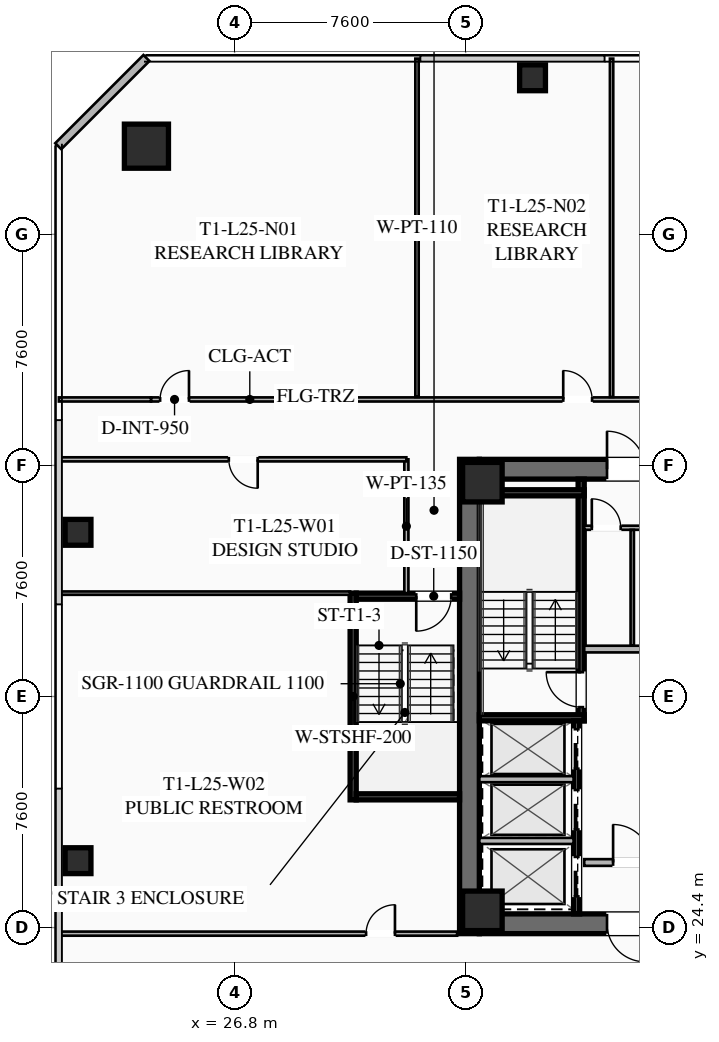
"""IFC4 building model, lengths in metres.
Left out: names, types, materials, properties, quantities, classifications, styles, units other than length and angle.
Written with IfcOpenShell. Run it as: python <this file> out.ifc"""

import sys

from ifc_helpers import new_model, si_unit, direction, frame, frame_2d, origin, origin_2d, place, context, subcontext, project, spatial, rectangle, hollow_rectangle, extrude, element, fill, save


model = new_model("IFC4")
c1 = context("Model", 3, precision=1e-05, world=origin(), true_north=direction((0.0, 1.0)))
c2 = subcontext(c1, "Body", "Model", "MODEL_VIEW")
j1 = project(units=[si_unit("LENGTHUNIT", "METRE"), si_unit("PLANEANGLEUNIT", "RADIAN")], contexts=[c1])
p1 = place(None, origin())
s1 = spatial("IfcSite", under=j1, at=p1, CompositionType="ELEMENT")
p2 = place(p1, origin())
s2 = spatial("IfcBuilding", under=s1, at=p2, CompositionType="ELEMENT")
p3 = place(p2, frame((0.0, 0.0, 95.6)))
s3 = spatial("IfcBuildingStorey", under=s2, at=p3, CompositionType="ELEMENT", Elevation=95.6)
p4 = place(p3, frame((34.525, 24.2, 0.0), z_axis=(0.0, 0.0, 1.0), x_axis=(0.0, 1.0, 0.0)))
e1 = element("IfcWall", 1, at=p4, inside=s3, PredefinedType="SHEAR", context=c2, shape_type="SweptSolid", body=[
    extrude(rectangle(XDim=15.6, YDim=0.65, at=frame_2d((7.8, 0.0))), origin(), (0.0, 0.0, 1.0), 3.55),
])
p5 = place(p3, frame((49.15, 24.525, 0.0), z_axis=(0.0, 0.0, 1.0), x_axis=(-1.0, 0.0, 0.0)))
e2 = element("IfcWall", 2, at=p5, inside=s3, PredefinedType="SHEAR", context=c2, shape_type="SweptSolid", body=[
    extrude(rectangle(XDim=14.3, YDim=0.65, at=frame_2d((7.15, 0.0))), origin(), (0.0, 0.0, 1.0), 3.55),
])
p6 = place(p5, frame((8.85, 0.0, 0.0)))
e3 = element("IfcOpeningElement", 3, at=p6, cuts=e2, PredefinedType="OPENING", context=c2, shape_type="SweptSolid", body=[
    extrude(rectangle(XDim=1.25, YDim=2.25, at=frame_2d((0.625, 1.125))), frame((0.0, 0.335, 0.0), z_axis=(0.0, -1.0, 0.0), x_axis=(1.0, 0.0, 0.0)), (0.0, 0.0, 1.0), 0.67),
])
p7 = place(p5, frame((3.8, 0.0, 0.0)))
e4 = element("IfcOpeningElement", 4, at=p7, cuts=e2, PredefinedType="OPENING", context=c2, shape_type="SweptSolid", body=[
    extrude(rectangle(XDim=1.25, YDim=2.25, at=frame_2d((0.625, 1.125))), frame((0.0, 0.335, 0.0), z_axis=(0.0, -1.0, 0.0), x_axis=(1.0, 0.0, 0.0)), (0.0, 0.0, 1.0), 0.67),
])
p8 = place(p3, frame((34.85, 39.475, 0.0), z_axis=(0.0, 0.0, 1.0), x_axis=(1.0, 0.0, 0.0)))
e5 = element("IfcWall", 5, at=p8, inside=s3, PredefinedType="SHEAR", context=c2, shape_type="SweptSolid", body=[
    extrude(rectangle(XDim=14.3, YDim=0.65, at=frame_2d((7.15, 0.0))), origin(), (0.0, 0.0, 1.0), 3.55),
])
p9 = place(p8, frame((4.2, 0.0, 0.0)))
e6 = element("IfcOpeningElement", 6, at=p9, cuts=e5, PredefinedType="OPENING", context=c2, shape_type="SweptSolid", body=[
    extrude(rectangle(XDim=1.25, YDim=2.25, at=frame_2d((0.625, 1.125))), frame((0.0, 0.335, 0.0), z_axis=(0.0, -1.0, 0.0), x_axis=(1.0, 0.0, 0.0)), (0.0, 0.0, 1.0), 0.67),
])
p10 = place(p8, frame((9.25, 0.0, 0.0)))
e7 = element("IfcOpeningElement", 7, at=p10, cuts=e5, PredefinedType="OPENING", context=c2, shape_type="SweptSolid", body=[
    extrude(rectangle(XDim=1.25, YDim=2.25, at=frame_2d((0.625, 1.125))), frame((0.0, 0.335, 0.0), z_axis=(0.0, -1.0, 0.0), x_axis=(1.0, 0.0, 0.0)), (0.0, 0.0, 1.0), 0.67),
])
for number, where, z_axis, x_axis in (
    (8, (34.95, 24.95, 0.0), (0.0, 0.0, 1.0), (1.0, 0.0, 0.0)),
    (9, (34.95, 39.05, 0.0), (0.0, 0.0, 1.0), (1.0, 0.0, 0.0)),
):
    element("IfcColumn", number, at=place(p3, frame(where, z_axis=z_axis, x_axis=x_axis)), inside=s3, PredefinedType="COLUMN", context=c2, shape_type="SweptSolid", body=[
        extrude(hollow_rectangle(XDim=1.3, YDim=1.3, WallThickness=0.05, at=origin_2d()), origin(), (0.0, 0.0, 1.0), 3.35),
    ])
p11 = place(p3, frame((23.9, 50.1, 0.0), z_axis=(0.0, 0.0, 1.0), x_axis=(1.0, 0.0, 0.0)))
e10 = element("IfcColumn", 10, at=p11, inside=s3, PredefinedType="COLUMN", context=c2, shape_type="SweptSolid", body=[
    extrude(hollow_rectangle(XDim=1.45, YDim=1.45, WallThickness=0.055, at=origin_2d()), origin(), (0.0, 0.0, 1.0), 3.35),
])
for number, where, z_axis, x_axis in (
    (11, (36.6, 52.35, 0.0), (0.0, 0.0, 1.0), (1.0, 0.0, 0.0)),
    (12, (21.65, 37.4, 0.0), (0.0, 0.0, 1.0), (1.0, 0.0, 0.0)),
    (13, (21.65, 26.6, 0.0), (0.0, 0.0, 1.0), (1.0, 0.0, 0.0)),
):
    element("IfcColumn", number, at=place(p3, frame(where, z_axis=z_axis, x_axis=x_axis)), inside=s3, PredefinedType="COLUMN", context=c2, shape_type="SweptSolid", body=[
        extrude(hollow_rectangle(XDim=0.85, YDim=0.85, WallThickness=0.035, at=origin_2d()), origin(), (0.0, 0.0, 1.0), 3.35),
    ])
p12 = place(p3, frame((21.0, 50.1, 0.0), z_axis=(0.0, 0.0, 1.0), x_axis=(0.707106781187, 0.707106781187, 0.0)))
e14 = element("IfcWall", 14, at=p12, inside=s3, PredefinedType="SOLIDWALL", context=c2, shape_type="SweptSolid", body=[
    extrude(rectangle(XDim=4.101, YDim=0.28, at=frame_2d((2.051, 0.0))), origin(), (0.0, 0.0, 1.0), 3.35),
])
p13 = place(p3, frame((38.2, 31.2, 0.0), z_axis=(0.0, 0.0, 1.0), x_axis=(0.0, 1.0, 0.0)))
e15 = element("IfcWall", 15, at=p13, inside=s3, PredefinedType="SHEAR", context=c2, shape_type="SweptSolid", body=[
    extrude(rectangle(XDim=7.95, YDim=0.2, at=frame_2d((3.975, 0.0))), origin(), (0.0, 0.0, 1.0), 3.35),
])
p14 = place(p13, frame((0.45, 0.0, 0.0)))
e16 = element("IfcOpeningElement", 16, at=p14, cuts=e15, PredefinedType="OPENING", context=c2, shape_type="SweptSolid", body=[
    extrude(rectangle(XDim=1.15, YDim=2.2, at=frame_2d((0.575, 1.1))), frame((0.0, 0.11, 0.0), z_axis=(0.0, -1.0, 0.0), x_axis=(1.0, 0.0, 0.0)), (0.0, 0.0, 1.0), 0.22),
])
for number, where, z_axis, x_axis in (
    (17, (34.85, 31.3, 0.0), (0.0, 0.0, 1.0), (1.0, 0.0, 0.0)),
    (18, (34.85, 38.7, 0.0), (0.0, 0.0, 1.0), (1.0, 0.0, 0.0)),
):
    element("IfcWall", number, at=place(p3, frame(where, z_axis=z_axis, x_axis=x_axis)), inside=s3, PredefinedType="SHEAR", context=c2, shape_type="SweptSolid", body=[
        extrude(rectangle(XDim=3.45, YDim=0.2, at=frame_2d((1.725, 0.0))), origin(), (0.0, 0.0, 1.0), 3.35),
    ])
p15 = place(p3, frame((38.3, 33.56, 0.0), z_axis=(0.0, 0.0, 1.0), x_axis=(1.0, 0.0, 0.0)))
e19 = element("IfcWall", 19, at=p15, inside=s3, PredefinedType="SOLIDWALL", context=c2, shape_type="SweptSolid", body=[
    extrude(rectangle(XDim=3.15, YDim=0.22, at=frame_2d((1.575, 0.0))), origin(), (0.0, 0.0, 1.0), 2.703),
])
p16 = place(p3, frame((38.3, 26.54, 0.0), z_axis=(0.0, 0.0, 1.0), x_axis=(1.0, 0.0, 0.0)))
e20 = element("IfcWall", 20, at=p16, inside=s3, PredefinedType="SOLIDWALL", context=c2, shape_type="SweptSolid", body=[
    extrude(rectangle(XDim=3.15, YDim=0.22, at=frame_2d((1.575, 0.0))), origin(), (0.0, 0.0, 1.0), 2.703),
])
p17 = place(p16, frame((0.95, 0.0, 0.0)))
e21 = element("IfcOpeningElement", 21, at=p17, cuts=e20, PredefinedType="OPENING", context=c2, shape_type="SweptSolid", body=[
    extrude(rectangle(XDim=1.25, YDim=2.25, at=frame_2d((0.625, 1.125))), frame((0.0, 0.12, 0.0), z_axis=(0.0, -1.0, 0.0), x_axis=(1.0, 0.0, 0.0)), (0.0, 0.0, 1.0), 0.24),
])
p18 = place(p3, frame((38.05, 24.85, 0.0), z_axis=(0.0, 0.0, 1.0), x_axis=(0.0, 1.0, 0.0)))
e22 = element("IfcWall", 22, at=p18, inside=s3, PredefinedType="SHEAR", context=c2, shape_type="SweptSolid", body=[
    extrude(rectangle(XDim=6.35, YDim=0.2, at=frame_2d((3.175, 0.0))), origin(), (0.0, 0.0, 1.0), 3.35),
])
p19 = place(p18, frame((4.775, 0.0, 0.0)))
e23 = element("IfcOpeningElement", 23, at=p19, cuts=e22, PredefinedType="OPENING", context=c2, shape_type="SweptSolid", body=[
    extrude(rectangle(XDim=1.3, YDim=2.25, at=frame_2d((0.65, 1.125))), frame((0.0, 0.11, 0.0), z_axis=(0.0, -1.0, 0.0), x_axis=(1.0, 0.0, 0.0)), (0.0, 0.0, 1.0), 0.22),
])
p20 = place(p18, frame((2.775, 0.0, 0.0)))
e24 = element("IfcOpeningElement", 24, at=p20, cuts=e22, PredefinedType="OPENING", context=c2, shape_type="SweptSolid", body=[
    extrude(rectangle(XDim=1.3, YDim=2.25, at=frame_2d((0.65, 1.125))), frame((0.0, 0.11, 0.0), z_axis=(0.0, -1.0, 0.0), x_axis=(1.0, 0.0, 0.0)), (0.0, 0.0, 1.0), 0.22),
])
p21 = place(p18, frame((0.575, 0.0, 0.0)))
e25 = element("IfcOpeningElement", 25, at=p21, cuts=e22, PredefinedType="OPENING", context=c2, shape_type="SweptSolid", body=[
    extrude(rectangle(XDim=1.3, YDim=2.25, at=frame_2d((0.65, 1.125))), frame((0.0, 0.11, 0.0), z_axis=(0.0, -1.0, 0.0), x_axis=(1.0, 0.0, 0.0)), (0.0, 0.0, 1.0), 0.22),
])
for number, where, z_axis, x_axis in (
    (26, (34.85, 27.25, 0.0), (0.0, 0.0, 1.0), (1.0, 0.0, 0.0)),
    (27, (34.85, 29.28, 0.0), (0.0, 0.0, 1.0), (1.0, 0.0, 0.0)),
):
    element("IfcWall", number, at=place(p3, frame(where, z_axis=z_axis, x_axis=x_axis)), inside=s3, PredefinedType="SOLIDWALL", context=c2, shape_type="SweptSolid", body=[
        extrude(rectangle(XDim=3.1, YDim=0.2, at=frame_2d((1.55, 0.0))), origin(), (0.0, 0.0, 1.0), 3.35),
    ])
p22 = place(p3, frame((38.3, 37.55, 0.0), z_axis=(0.0, 0.0, 1.0), x_axis=(1.0, 0.0, 0.0)))
e28 = element("IfcWall", 28, at=p22, inside=s3, PredefinedType="PARTITIONING", context=c2, shape_type="SweptSolid", body=[
    extrude(rectangle(XDim=3.15, YDim=0.135, at=frame_2d((1.575, 0.0))), origin(), (0.0, 0.0, 1.0), 2.703),
])
p23 = place(p22, frame((0.25, 0.0, 0.0)))
e29 = element("IfcOpeningElement", 29, at=p23, cuts=e28, PredefinedType="OPENING", context=c2, shape_type="SweptSolid", body=[
    extrude(rectangle(XDim=0.95, YDim=2.05, at=frame_2d((0.475, 1.025))), frame((0.0, 0.077, 0.0), z_axis=(0.0, -1.0, 0.0), x_axis=(1.0, 0.0, 0.0)), (0.0, 0.0, 1.0), 0.155),
])
p24 = place(p22, frame((1.95, 0.0, 0.0)))
e30 = element("IfcOpeningElement", 30, at=p24, cuts=e28, PredefinedType="OPENING", context=c2, shape_type="SweptSolid", body=[
    extrude(rectangle(XDim=0.95, YDim=2.05, at=frame_2d((0.475, 1.025))), frame((0.0, 0.077, 0.0), z_axis=(0.0, -1.0, 0.0), x_axis=(1.0, 0.0, 0.0)), (0.0, 0.0, 1.0), 0.155),
])
p25 = place(p3, frame((39.88, 33.68, 0.0), z_axis=(0.0, 0.0, 1.0), x_axis=(0.0, 1.0, 0.0)))
e31 = element("IfcWall", 31, at=p25, inside=s3, PredefinedType="PARTITIONING", context=c2, shape_type="SweptSolid", body=[
    extrude(rectangle(XDim=3.8, YDim=0.11, at=frame_2d((1.9, 0.0))), origin(), (0.0, 0.0, 1.0), 2.703),
])
p26 = place(p3, frame((30.7, 28.6, 0.0), z_axis=(0.0, 0.0, 1.0), x_axis=(0.0, 1.0, 0.0)))
e32 = element("IfcWall", 32, at=p26, inside=s3, PredefinedType="SHEAR", context=c2, shape_type="SweptSolid", body=[
    extrude(rectangle(XDim=6.8, YDim=0.2, at=frame_2d((3.4, 0.0))), origin(), (0.0, 0.0, 1.0), 3.35),
])
p27 = place(p3, frame((34.2, 35.3, 0.0), z_axis=(0.0, 0.0, 1.0), x_axis=(-1.0, 0.0, 0.0)))
e33 = element("IfcWall", 33, at=p27, inside=s3, PredefinedType="SHEAR", context=c2, shape_type="SweptSolid", body=[
    extrude(rectangle(XDim=3.4, YDim=0.2, at=frame_2d((1.7, 0.0))), origin(), (0.0, 0.0, 1.0), 3.35),
])
p28 = place(p27, frame((0.275, 0.0, 0.0)))
e34 = element("IfcOpeningElement", 34, at=p28, cuts=e33, PredefinedType="OPENING", context=c2, shape_type="SweptSolid", body=[
    extrude(rectangle(XDim=1.15, YDim=2.2, at=frame_2d((0.575, 1.1))), frame((0.0, 0.11, 0.0), z_axis=(0.0, -1.0, 0.0), x_axis=(1.0, 0.0, 0.0)), (0.0, 0.0, 1.0), 0.22),
])
p29 = place(p3, frame((30.8, 28.7, 0.0), z_axis=(0.0, 0.0, 1.0), x_axis=(1.0, 0.0, 0.0)))
e35 = element("IfcWall", 35, at=p29, inside=s3, PredefinedType="SHEAR", context=c2, shape_type="SweptSolid", body=[
    extrude(rectangle(XDim=3.4, YDim=0.2, at=frame_2d((1.7, 0.0))), origin(), (0.0, 0.0, 1.0), 3.35),
])
p30 = place(p3, frame((32.45, 35.4, 0.0), z_axis=(0.0, 0.0, 1.0), x_axis=(0.0, 1.0, 0.0)))
e36 = element("IfcWall", 36, at=p30, inside=s3, PredefinedType="PARTITIONING", context=c2, shape_type="SweptSolid", body=[
    extrude(rectangle(XDim=4.4, YDim=0.135, at=frame_2d((2.2, 0.0))), origin(), (0.0, 0.0, 1.0), 2.703),
])
p31 = place(p3, frame((24.05, 41.77, 0.0), z_axis=(0.0, 0.0, 1.0), x_axis=(1.0, 0.0, 0.0)))
e37 = element("IfcWall", 37, at=p31, inside=s3, PredefinedType="PARTITIONING", context=c2, shape_type="SweptSolid", body=[
    extrude(rectangle(XDim=29.2, YDim=0.135, at=frame_2d((14.6, 0.0))), origin(), (0.0, 0.0, 1.0), 2.703),
])
p32 = place(p31, frame((0.3, 0.0, 0.0)))
e38 = element("IfcOpeningElement", 38, at=p32, cuts=e37, PredefinedType="OPENING", context=c2, shape_type="SweptSolid", body=[
    extrude(rectangle(XDim=0.95, YDim=2.05, at=frame_2d((0.475, 1.025))), frame((0.0, 0.077, 0.0), z_axis=(0.0, -1.0, 0.0), x_axis=(1.0, 0.0, 0.0)), (0.0, 0.0, 1.0), 0.155),
])
p33 = place(p31, frame((13.559, 0.0, 0.0)))
e39 = element("IfcOpeningElement", 39, at=p33, cuts=e37, PredefinedType="OPENING", context=c2, shape_type="SweptSolid", body=[
    extrude(rectangle(XDim=0.95, YDim=2.05, at=frame_2d((0.475, 1.025))), frame((0.0, 0.077, 0.0), z_axis=(0.0, -1.0, 0.0), x_axis=(1.0, 0.0, 0.0)), (0.0, 0.0, 1.0), 0.155),
])
p34 = place(p31, frame((17.605, 0.0, 0.0)))
e40 = element("IfcOpeningElement", 40, at=p34, cuts=e37, PredefinedType="OPENING", context=c2, shape_type="SweptSolid", body=[
    extrude(rectangle(XDim=0.95, YDim=2.05, at=frame_2d((0.475, 1.025))), frame((0.0, 0.077, 0.0), z_axis=(0.0, -1.0, 0.0), x_axis=(1.0, 0.0, 0.0)), (0.0, 0.0, 1.0), 0.155),
])
p35 = place(p31, frame((21.649, 0.0, 0.0)))
e41 = element("IfcOpeningElement", 41, at=p35, cuts=e37, PredefinedType="OPENING", context=c2, shape_type="SweptSolid", body=[
    extrude(rectangle(XDim=0.95, YDim=2.05, at=frame_2d((0.475, 1.025))), frame((0.0, 0.077, 0.0), z_axis=(0.0, -1.0, 0.0), x_axis=(1.0, 0.0, 0.0)), (0.0, 0.0, 1.0), 0.155),
])
p36 = place(p31, frame((27.95, 0.0, 0.0)))
e42 = element("IfcOpeningElement", 42, at=p36, cuts=e37, PredefinedType="OPENING", context=c2, shape_type="SweptSolid", body=[
    extrude(rectangle(XDim=0.95, YDim=2.05, at=frame_2d((0.475, 1.025))), frame((0.0, 0.077, 0.0), z_axis=(0.0, -1.0, 0.0), x_axis=(1.0, 0.0, 0.0)), (0.0, 0.0, 1.0), 0.155),
])
p37 = place(p3, frame((21.02, 41.77, 0.0), z_axis=(0.0, 0.0, 1.0), x_axis=(1.0, 0.0, 0.0)))
e43 = element("IfcWall", 43, at=p37, inside=s3, PredefinedType="PARTITIONING", context=c2, shape_type="SweptSolid", body=[
    extrude(rectangle(XDim=3.03, YDim=0.135, at=frame_2d((1.515, 0.0))), origin(), (0.0, 0.0, 1.0), 2.703),
])
for number, where, z_axis, x_axis in (
    (44, (32.8, 41.85, 0.0), (0.0, 0.0, 1.0), (0.0, 1.0, 0.0)),
    (45, (39.2, 41.85, 0.0), (0.0, 0.0, 1.0), (0.0, 1.0, 0.0)),
):
    element("IfcWall", number, at=place(p3, frame(where, z_axis=z_axis, x_axis=x_axis)), inside=s3, PredefinedType="PARTITIONING", context=c2, shape_type="SweptSolid", body=[
        extrude(rectangle(XDim=11.13, YDim=0.11, at=frame_2d((5.565, 0.0))), origin(), (0.0, 0.0, 1.0), 2.703),
    ])
p38 = place(p3, frame((32.45, 39.8, 0.0), z_axis=(0.0, 0.0, 1.0), x_axis=(-1.0, 0.0, 0.0)))
e46 = element("IfcWall", 46, at=p38, inside=s3, PredefinedType="PARTITIONING", context=c2, shape_type="SweptSolid", body=[
    extrude(rectangle(XDim=11.43, YDim=0.135, at=frame_2d((5.715, 0.0))), origin(), (0.0, 0.0, 1.0), 2.703),
])
p39 = place(p38, frame((4.89, 0.0, 0.0)))
e47 = element("IfcOpeningElement", 47, at=p39, cuts=e46, PredefinedType="OPENING", context=c2, shape_type="SweptSolid", body=[
    extrude(rectangle(XDim=0.95, YDim=2.05, at=frame_2d((0.475, 1.025))), frame((0.0, 0.077, 0.0), z_axis=(0.0, -1.0, 0.0), x_axis=(1.0, 0.0, 0.0)), (0.0, 0.0, 1.0), 0.155),
])
p40 = place(p3, frame((21.02, 24.2, 0.0), z_axis=(0.0, 0.0, 1.0), x_axis=(1.0, 0.0, 0.0)))
e48 = element("IfcWall", 48, at=p40, inside=s3, PredefinedType="PARTITIONING", context=c2, shape_type="SweptSolid", body=[
    extrude(rectangle(XDim=13.1, YDim=0.135, at=frame_2d((6.55, 0.0))), origin(), (0.0, 0.0, 1.0), 2.703),
])
p41 = place(p40, frame((10.105, 0.0, 0.0)))
e49 = element("IfcOpeningElement", 49, at=p41, cuts=e48, PredefinedType="OPENING", context=c2, shape_type="SweptSolid", body=[
    extrude(rectangle(XDim=0.95, YDim=2.05, at=frame_2d((0.475, 1.025))), frame((0.0, 0.077, 0.0), z_axis=(0.0, -1.0, 0.0), x_axis=(1.0, 0.0, 0.0)), (0.0, 0.0, 1.0), 0.155),
])
p42 = place(p3, frame((30.6, 35.4, 0.0), z_axis=(0.0, 0.0, 1.0), x_axis=(-1.0, 0.0, 0.0)))
e50 = element("IfcWall", 50, at=p42, inside=s3, PredefinedType="PARTITIONING", context=c2, shape_type="SweptSolid", body=[
    extrude(rectangle(XDim=9.58, YDim=0.11, at=frame_2d((4.79, 0.0))), origin(), (0.0, 0.0, 1.0), 2.703),
])
p43 = place(p9, origin())
e51 = element("IfcDoor", 51, at=p43, inside=s3, OperationType="SINGLE_SWING_LEFT", PredefinedType="DOOR", context=c2, shape_type="SweptSolid", body=[
    extrude(rectangle(XDim=1.25, YDim=2.25, at=frame_2d((0.625, 1.125))), frame((0.0, 0.025, 0.0), z_axis=(0.0, -1.0, 0.0), x_axis=(1.0, 0.0, 0.0)), (0.0, 0.0, 1.0), 0.05),
])
fill(e6, e51)
p44 = place(p6, origin())
e52 = element("IfcDoor", 52, at=p44, inside=s3, OperationType="SINGLE_SWING_LEFT", PredefinedType="DOOR", context=c2, shape_type="SweptSolid", body=[
    extrude(rectangle(XDim=1.25, YDim=2.25, at=frame_2d((0.625, 1.125))), frame((0.0, 0.025, 0.0), z_axis=(0.0, -1.0, 0.0), x_axis=(1.0, 0.0, 0.0)), (0.0, 0.0, 1.0), 0.05),
])
fill(e3, e52)
p45 = place(p14, origin())
e53 = element("IfcDoor", 53, at=p45, inside=s3, OperationType="SINGLE_SWING_RIGHT", PredefinedType="DOOR", context=c2, shape_type="SweptSolid", body=[
    extrude(rectangle(XDim=1.15, YDim=2.2, at=frame_2d((0.575, 1.1))), frame((0.0, 0.025, 0.0), z_axis=(0.0, -1.0, 0.0), x_axis=(1.0, 0.0, 0.0)), (0.0, 0.0, 1.0), 0.05),
])
fill(e16, e53)
p46 = place(p17, origin())
e54 = element("IfcDoor", 54, at=p46, inside=s3, OperationType="SINGLE_SWING_LEFT", PredefinedType="DOOR", context=c2, shape_type="SweptSolid", body=[
    extrude(rectangle(XDim=1.25, YDim=2.25, at=frame_2d((0.625, 1.125))), frame((0.0, 0.025, 0.0), z_axis=(0.0, -1.0, 0.0), x_axis=(1.0, 0.0, 0.0)), (0.0, 0.0, 1.0), 0.05),
])
fill(e21, e54)
p47 = place(p23, origin())
e55 = element("IfcDoor", 55, at=p47, inside=s3, OperationType="SINGLE_SWING_LEFT", PredefinedType="DOOR", context=c2, shape_type="SweptSolid", body=[
    extrude(rectangle(XDim=0.95, YDim=2.05, at=frame_2d((0.475, 1.025))), frame((0.0, 0.025, 0.0), z_axis=(0.0, -1.0, 0.0), x_axis=(1.0, 0.0, 0.0)), (0.0, 0.0, 1.0), 0.05),
])
fill(e29, e55)
p48 = place(p28, origin())
e56 = element("IfcDoor", 56, at=p48, inside=s3, OperationType="SINGLE_SWING_RIGHT", PredefinedType="DOOR", context=c2, shape_type="SweptSolid", body=[
    extrude(rectangle(XDim=1.15, YDim=2.2, at=frame_2d((0.575, 1.1))), frame((0.0, 0.025, 0.0), z_axis=(0.0, -1.0, 0.0), x_axis=(1.0, 0.0, 0.0)), (0.0, 0.0, 1.0), 0.05),
])
fill(e34, e56)
p49 = place(p32, origin())
e57 = element("IfcDoor", 57, at=p49, inside=s3, OperationType="SINGLE_SWING_RIGHT", PredefinedType="DOOR", context=c2, shape_type="SweptSolid", body=[
    extrude(rectangle(XDim=0.95, YDim=2.05, at=frame_2d((0.475, 1.025))), frame((0.0, 0.025, 0.0), z_axis=(0.0, -1.0, 0.0), x_axis=(1.0, 0.0, 0.0)), (0.0, 0.0, 1.0), 0.05),
])
fill(e38, e57)
p50 = place(p33, origin())
e58 = element("IfcDoor", 58, at=p50, inside=s3, OperationType="SINGLE_SWING_LEFT", PredefinedType="DOOR", context=c2, shape_type="SweptSolid", body=[
    extrude(rectangle(XDim=0.95, YDim=2.05, at=frame_2d((0.475, 1.025))), frame((0.0, 0.025, 0.0), z_axis=(0.0, -1.0, 0.0), x_axis=(1.0, 0.0, 0.0)), (0.0, 0.0, 1.0), 0.05),
])
fill(e39, e58)
p51 = place(p39, origin())
e59 = element("IfcDoor", 59, at=p51, inside=s3, OperationType="SINGLE_SWING_LEFT", PredefinedType="DOOR", context=c2, shape_type="SweptSolid", body=[
    extrude(rectangle(XDim=0.95, YDim=2.05, at=frame_2d((0.475, 1.025))), frame((0.0, 0.025, 0.0), z_axis=(0.0, -1.0, 0.0), x_axis=(1.0, 0.0, 0.0)), (0.0, 0.0, 1.0), 0.05),
])
fill(e47, e59)
p52 = place(p41, origin())
e60 = element("IfcDoor", 60, at=p52, inside=s3, OperationType="SINGLE_SWING_RIGHT", PredefinedType="DOOR", context=c2, shape_type="SweptSolid", body=[
    extrude(rectangle(XDim=0.95, YDim=2.05, at=frame_2d((0.475, 1.025))), frame((0.0, 0.025, 0.0), z_axis=(0.0, -1.0, 0.0), x_axis=(1.0, 0.0, 0.0)), (0.0, 0.0, 1.0), 0.05),
])
fill(e49, e60)
p53 = place(p19, origin())
e61 = element("IfcDoor", 61, at=p53, inside=s3, OperationType="SLIDING_TO_LEFT", PredefinedType="DOOR", context=c2, shape_type="SweptSolid", body=[
    extrude(rectangle(XDim=1.3, YDim=2.25, at=frame_2d((0.65, 1.125))), frame((0.0, 0.025, 0.0), z_axis=(0.0, -1.0, 0.0), x_axis=(1.0, 0.0, 0.0)), (0.0, 0.0, 1.0), 0.05),
])
fill(e23, e61)
p54 = place(p20, origin())
e62 = element("IfcDoor", 62, at=p54, inside=s3, OperationType="SLIDING_TO_LEFT", PredefinedType="DOOR", context=c2, shape_type="SweptSolid", body=[
    extrude(rectangle(XDim=1.3, YDim=2.25, at=frame_2d((0.65, 1.125))), frame((0.0, 0.025, 0.0), z_axis=(0.0, -1.0, 0.0), x_axis=(1.0, 0.0, 0.0)), (0.0, 0.0, 1.0), 0.05),
])
fill(e24, e62)
p55 = place(p21, origin())
e63 = element("IfcDoor", 63, at=p55, inside=s3, OperationType="SLIDING_TO_LEFT", PredefinedType="DOOR", context=c2, shape_type="SweptSolid", body=[
    extrude(rectangle(XDim=1.3, YDim=2.25, at=frame_2d((0.65, 1.125))), frame((0.0, 0.025, 0.0), z_axis=(0.0, -1.0, 0.0), x_axis=(1.0, 0.0, 0.0)), (0.0, 0.0, 1.0), 0.05),
])
fill(e25, e63)
save(model, sys.argv[1])
